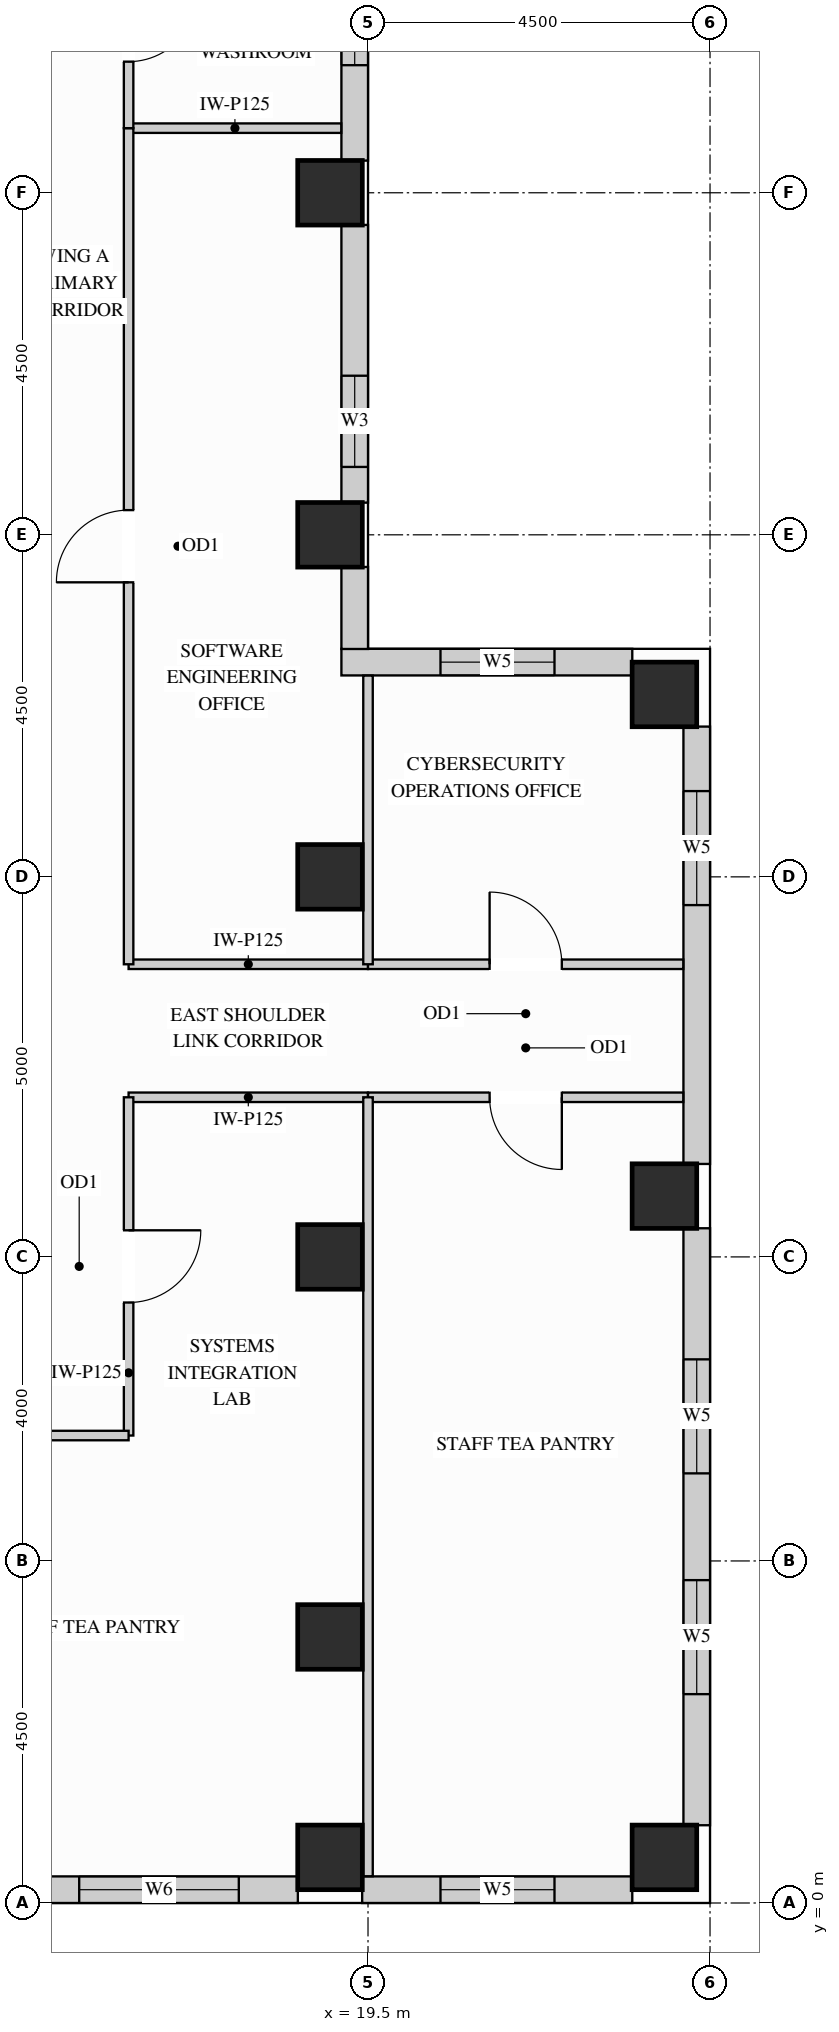
"""IFC4 building model, lengths in metres.
Left out: names, types, materials, properties, quantities, classifications, styles, units other than length and angle.
Written with IfcOpenShell. Run it as: python <this file> out.ifc"""

import sys

from ifc_helpers import new_model, si_unit, direction, frame, frame_2d, origin, origin_2d, place, context, subcontext, project, spatial, rectangle, extrude, source, transform, mapped, element, fill, save


model = new_model("IFC4")
c1 = context("Model", 3, precision=1e-05, world=origin(), true_north=direction((0.0, 1.0)))
c2 = subcontext(c1, "Body", "Model", "MODEL_VIEW")
j1 = project(units=[si_unit("LENGTHUNIT", "METRE"), si_unit("PLANEANGLEUNIT", "RADIAN")], contexts=[c1])
p1 = place(None, origin())
s1 = spatial("IfcSite", under=j1, at=p1, CompositionType="ELEMENT")
p2 = place(p1, origin())
s2 = spatial("IfcBuilding", under=s1, at=p2, CompositionType="ELEMENT")
p3 = place(p2, frame((0.0, 0.0, 266.4)))
s3 = spatial("IfcBuildingStorey", under=s2, at=p3, CompositionType="ELEMENT", Elevation=266.4)
m1 = source(origin(), c2, "Body", "SweptSolid", [
    extrude(rectangle(XDim=0.85, YDim=0.85, at=origin_2d()), origin(), (0.0, 0.0, 1.0), 3.4),
])
for number, where, z_axis, x_axis in (
    (1, (19.0, 13.5, 0.0), (0.0, 0.0, 1.0), (1.0, 0.0, 0.0)),
    (2, (19.0, 18.0, 0.0), (0.0, 0.0, 1.0), (1.0, 0.0, 0.0)),
    (3, (19.0, 22.5, 0.0), (0.0, 0.0, 1.0), (1.0, 0.0, 0.0)),
    (4, (19.0, 3.5, 0.0), (0.0, 0.0, 1.0), (1.0, 0.0, 0.0)),
    (5, (19.0, 8.5, 0.0), (0.0, 0.0, 1.0), (1.0, 0.0, 0.0)),
    (6, (19.0, 0.6, 0.0), (0.0, 0.0, 1.0), (1.0, 0.0, 0.0)),
    (7, (23.4, 0.6, 0.0), (0.0, 0.0, 1.0), (1.0, 0.0, 0.0)),
    (8, (23.4, 15.9, 0.0), (0.0, 0.0, 1.0), (1.0, 0.0, 0.0)),
    (9, (23.4, 9.3, 0.0), (0.0, 0.0, 1.0), (1.0, 0.0, 0.0)),
):
    element("IfcColumn", number, at=place(p3, frame(where, z_axis=z_axis, x_axis=x_axis)), inside=s3, PredefinedType="COLUMN", context=c2, shape_type="MappedRepresentation", body=[
        mapped(m1, transform((0.0, 0.0, 0.0), x_axis=(1.0, 0.0, 0.0), y_axis=(0.0, 1.0, 0.0), z_axis=(0.0, 0.0, 1.0))),
    ])
p4 = place(p3, frame((14.923, 0.175, 0.0), z_axis=(0.0, 0.0, 1.0), x_axis=(1.0, 0.0, 0.0)))
e10 = element("IfcWall", 10, at=p4, inside=s3, PredefinedType="SOLIDWALL", context=c2, shape_type="SweptSolid", body=[
    extrude(rectangle(XDim=3.654, YDim=0.35, at=frame_2d((1.827, 0.0))), origin(), (0.0, 0.0, 1.0), 3.385),
])
p5 = place(p4, frame((0.777, 0.0, 0.78)))
e11 = element("IfcOpeningElement", 11, at=p5, cuts=e10, PredefinedType="OPENING", context=c2, shape_type="SweptSolid", body=[
    extrude(rectangle(XDim=2.1, YDim=2.25, at=frame_2d((1.05, 1.125))), frame((0.0, 0.185, 0.0), z_axis=(0.0, -1.0, 0.0), x_axis=(1.0, 0.0, 0.0)), (0.0, 0.0, 1.0), 0.37),
])
p6 = place(p3, frame((19.423, 0.175, 0.0), z_axis=(0.0, 0.0, 1.0), x_axis=(1.0, 0.0, 0.0)))
e12 = element("IfcWall", 12, at=p6, inside=s3, PredefinedType="SOLIDWALL", context=c2, shape_type="SweptSolid", body=[
    extrude(rectangle(XDim=3.554, YDim=0.35, at=frame_2d((1.777, 0.0))), origin(), (0.0, 0.0, 1.0), 3.385),
])
p7 = place(p6, frame((1.031, 0.0, 0.78)))
e13 = element("IfcOpeningElement", 13, at=p7, cuts=e12, PredefinedType="OPENING", context=c2, shape_type="SweptSolid", body=[
    extrude(rectangle(XDim=1.5, YDim=2.0, at=frame_2d((0.75, 1.0))), frame((0.0, 0.185, 0.0), z_axis=(0.0, -1.0, 0.0), x_axis=(1.0, 0.0, 0.0)), (0.0, 0.0, 1.0), 0.37),
])
p8 = place(p3, frame((23.825, 1.023, 0.0), z_axis=(0.0, 0.0, 1.0), x_axis=(0.0, 1.0, 0.0)))
e14 = element("IfcWall", 14, at=p8, inside=s3, PredefinedType="SOLIDWALL", context=c2, shape_type="SweptSolid", body=[
    extrude(rectangle(XDim=7.854, YDim=0.35, at=frame_2d((3.927, 0.0))), origin(), (0.0, 0.0, 1.0), 3.385),
])
p9 = place(p8, frame((1.725, 0.0, 0.78)))
e15 = element("IfcOpeningElement", 15, at=p9, cuts=e14, PredefinedType="OPENING", context=c2, shape_type="SweptSolid", body=[
    extrude(rectangle(XDim=1.5, YDim=2.0, at=frame_2d((0.75, 1.0))), frame((0.0, 0.185, 0.0), z_axis=(0.0, -1.0, 0.0), x_axis=(1.0, 0.0, 0.0)), (0.0, 0.0, 1.0), 0.37),
])
p10 = place(p8, frame((4.629, 0.0, 0.78)))
e16 = element("IfcOpeningElement", 16, at=p10, cuts=e14, PredefinedType="OPENING", context=c2, shape_type="SweptSolid", body=[
    extrude(rectangle(XDim=1.5, YDim=2.0, at=frame_2d((0.75, 1.0))), frame((0.0, 0.185, 0.0), z_axis=(0.0, -1.0, 0.0), x_axis=(1.0, 0.0, 0.0)), (0.0, 0.0, 1.0), 0.37),
])
p11 = place(p3, frame((23.825, 9.723, 0.0), z_axis=(0.0, 0.0, 1.0), x_axis=(0.0, 1.0, 0.0)))
e17 = element("IfcWall", 17, at=p11, inside=s3, PredefinedType="SOLIDWALL", context=c2, shape_type="SweptSolid", body=[
    extrude(rectangle(XDim=5.754, YDim=0.35, at=frame_2d((2.877, 0.0))), origin(), (0.0, 0.0, 1.0), 3.385),
])
p12 = place(p11, frame((3.406, 0.0, 0.78)))
e18 = element("IfcOpeningElement", 18, at=p12, cuts=e17, PredefinedType="OPENING", context=c2, shape_type="SweptSolid", body=[
    extrude(rectangle(XDim=1.5, YDim=2.0, at=frame_2d((0.75, 1.0))), frame((0.0, 0.185, 0.0), z_axis=(0.0, -1.0, 0.0), x_axis=(1.0, 0.0, 0.0)), (0.0, 0.0, 1.0), 0.37),
])
p13 = place(p3, frame((22.977, 16.325, 0.0), z_axis=(0.0, 0.0, 1.0), x_axis=(-1.0, 0.0, 0.0)))
e19 = element("IfcWall", 19, at=p13, inside=s3, PredefinedType="SOLIDWALL", context=c2, shape_type="SweptSolid", body=[
    extrude(rectangle(XDim=3.827, YDim=0.35, at=frame_2d((1.914, 0.0))), origin(), (0.0, 0.0, 1.0), 3.385),
])
p14 = place(p13, frame((1.023, 0.0, 0.78)))
e20 = element("IfcOpeningElement", 20, at=p14, cuts=e19, PredefinedType="OPENING", context=c2, shape_type="SweptSolid", body=[
    extrude(rectangle(XDim=1.5, YDim=2.0, at=frame_2d((0.75, 1.0))), frame((0.0, 0.185, 0.0), z_axis=(0.0, -1.0, 0.0), x_axis=(1.0, 0.0, 0.0)), (0.0, 0.0, 1.0), 0.37),
])
m2 = source(origin(), c2, "Body", "SweptSolid", [
    extrude(rectangle(XDim=1.079, YDim=0.35, at=frame_2d((0.54, 0.0))), origin(), (0.0, 0.0, 1.0), 2.619),
])
p15 = place(p3, frame((19.325, 16.498, 0.0), z_axis=(0.0, 0.0, 1.0), x_axis=(0.0, 1.0, 0.0)))
e21 = element("IfcWall", 21, at=p15, inside=s3, PredefinedType="SOLIDWALL", context=c2, shape_type="MappedRepresentation", body=[
    mapped(m2, transform((0.0, 0.0, 0.0), x_axis=(1.0, 0.0, 0.0), y_axis=(0.0, 1.0, 0.0), z_axis=(0.0, 0.0, 1.0))),
])
p16 = place(p3, frame((19.325, 18.423, 0.0), z_axis=(0.0, 0.0, 1.0), x_axis=(0.0, 1.0, 0.0)))
e22 = element("IfcWall", 22, at=p16, inside=s3, PredefinedType="SOLIDWALL", context=c2, shape_type="SweptSolid", body=[
    extrude(rectangle(XDim=3.654, YDim=0.35, at=frame_2d((1.827, 0.0))), origin(), (0.0, 0.0, 1.0), 2.619),
])
p17 = place(p16, frame((0.47, 0.0, 0.78)))
e23 = element("IfcOpeningElement", 23, at=p17, cuts=e22, PredefinedType="OPENING", context=c2, shape_type="SweptSolid", body=[
    extrude(rectangle(XDim=1.2, YDim=1.659, at=frame_2d((0.6, 0.83))), frame((0.0, 0.185, 0.0), z_axis=(0.0, -1.0, 0.0), x_axis=(1.0, 0.0, 0.0)), (0.0, 0.0, 1.0), 0.37),
])
p18 = place(p3, frame((19.325, 22.923, 0.0), z_axis=(0.0, 0.0, 1.0), x_axis=(0.0, 1.0, 0.0)))
e24 = element("IfcWall", 24, at=p18, inside=s3, PredefinedType="SOLIDWALL", context=c2, shape_type="SweptSolid", body=[
    extrude(rectangle(XDim=3.454, YDim=0.35, at=frame_2d((1.727, 0.0))), origin(), (0.0, 0.0, 1.0), 2.619),
])
p19 = place(p18, frame((1.256, 0.0, 0.78)))
e25 = element("IfcOpeningElement", 25, at=p19, cuts=e24, PredefinedType="OPENING", context=c2, shape_type="SweptSolid", body=[
    extrude(rectangle(XDim=1.5, YDim=1.659, at=frame_2d((0.75, 0.83))), frame((0.0, 0.185, 0.0), z_axis=(0.0, -1.0, 0.0), x_axis=(1.0, 0.0, 0.0)), (0.0, 0.0, 1.0), 0.37),
])
m3 = source(origin(), c2, "Body", "SweptSolid", [
    extrude(rectangle(XDim=2.798, YDim=0.125, at=frame_2d((1.399, 0.0))), origin(), (0.0, 0.0, 1.0), 3.385),
])
p20 = place(p3, frame((16.35, 23.35, 0.0), z_axis=(0.0, 0.0, 1.0), x_axis=(1.0, 0.0, 0.0)))
e26 = element("IfcWall", 26, at=p20, inside=s3, PredefinedType="PARTITIONING", context=c2, shape_type="MappedRepresentation", body=[
    mapped(m3, transform((0.0, 0.0, 0.0), x_axis=(1.0, 0.0, 0.0), y_axis=(0.0, 1.0, 0.0), z_axis=(0.0, 0.0, 1.0))),
])
m4 = source(origin(), c2, "Body", "SweptSolid", [
    extrude(rectangle(XDim=3.15, YDim=0.125, at=frame_2d((1.575, 0.0))), origin(), (0.0, 0.0, 1.0), 3.385),
])
for number, where, z_axis, x_axis in (
    (27, (16.35, 12.35, 0.0), (0.0, 0.0, 1.0), (1.0, 0.0, 0.0)),
    (28, (16.35, 10.6, 0.0), (0.0, 0.0, 1.0), (1.0, 0.0, 0.0)),
):
    element("IfcWall", number, at=place(p3, frame(where, z_axis=z_axis, x_axis=x_axis)), inside=s3, PredefinedType="PARTITIONING", context=c2, shape_type="MappedRepresentation", body=[
        mapped(m4, transform((0.0, 0.0, 0.0), x_axis=(1.0, 0.0, 0.0), y_axis=(0.0, 1.0, 0.0), z_axis=(0.0, 0.0, 1.0))),
    ])
p21 = place(p3, frame((16.35, 6.15, 0.0), z_axis=(0.0, 0.0, 1.0), x_axis=(0.0, 1.0, 0.0)))
e29 = element("IfcWall", 29, at=p21, inside=s3, PredefinedType="PARTITIONING", context=c2, shape_type="SweptSolid", body=[
    extrude(rectangle(XDim=4.45, YDim=0.125, at=frame_2d((2.225, 0.0))), origin(), (0.0, 0.0, 1.0), 3.385),
])
p22 = place(p21, frame((1.75, 0.0, 0.0)))
e30 = element("IfcOpeningElement", 30, at=p22, cuts=e29, PredefinedType="OPENING", context=c2, shape_type="SweptSolid", body=[
    extrude(rectangle(XDim=0.95, YDim=2.15, at=frame_2d((0.475, 1.075))), frame((0.0, 0.073, 0.0), z_axis=(0.0, -1.0, 0.0), x_axis=(1.0, 0.0, 0.0)), (0.0, 0.0, 1.0), 0.145),
])
p23 = place(p3, frame((16.35, 12.35, 0.0), z_axis=(0.0, 0.0, 1.0), x_axis=(0.0, 1.0, 0.0)))
e31 = element("IfcWall", 31, at=p23, inside=s3, PredefinedType="PARTITIONING", context=c2, shape_type="SweptSolid", body=[
    extrude(rectangle(XDim=11.0, YDim=0.125, at=frame_2d((5.5, 0.0))), origin(), (0.0, 0.0, 1.0), 3.385),
])
p24 = place(p23, frame((5.025, 0.0, 0.0)))
e32 = element("IfcOpeningElement", 32, at=p24, cuts=e31, PredefinedType="OPENING", context=c2, shape_type="SweptSolid", body=[
    extrude(rectangle(XDim=0.95, YDim=2.15, at=frame_2d((0.475, 1.075))), frame((0.0, 0.073, 0.0), z_axis=(0.0, -1.0, 0.0), x_axis=(1.0, 0.0, 0.0)), (0.0, 0.0, 1.0), 0.145),
])
p25 = place(p3, frame((16.35, 23.35, 0.0), z_axis=(0.0, 0.0, 1.0), x_axis=(0.0, 1.0, 0.0)))
e33 = element("IfcWall", 33, at=p25, inside=s3, PredefinedType="PARTITIONING", context=c2, shape_type="SweptSolid", body=[
    extrude(rectangle(XDim=2.7, YDim=0.125, at=frame_2d((1.35, 0.0))), origin(), (0.0, 0.0, 1.0), 3.385),
])
p26 = place(p25, frame((0.875, 0.0, 0.0)))
e34 = element("IfcOpeningElement", 34, at=p26, cuts=e33, PredefinedType="OPENING", context=c2, shape_type="SweptSolid", body=[
    extrude(rectangle(XDim=0.9, YDim=2.15, at=frame_2d((0.45, 1.075))), frame((0.0, 0.073, 0.0), z_axis=(0.0, -1.0, 0.0), x_axis=(1.0, 0.0, 0.0)), (0.0, 0.0, 1.0), 0.145),
])
p27 = place(p3, frame((19.5, 10.6, 0.0), z_axis=(0.0, 0.0, 1.0), x_axis=(1.0, 0.0, 0.0)))
e35 = element("IfcWall", 35, at=p27, inside=s3, PredefinedType="PARTITIONING", context=c2, shape_type="SweptSolid", body=[
    extrude(rectangle(XDim=4.148, YDim=0.125, at=frame_2d((2.074, 0.0))), origin(), (0.0, 0.0, 1.0), 3.385),
])
p28 = place(p27, frame((1.6, 0.0, 0.0)))
e36 = element("IfcOpeningElement", 36, at=p28, cuts=e35, PredefinedType="OPENING", context=c2, shape_type="SweptSolid", body=[
    extrude(rectangle(XDim=0.95, YDim=2.15, at=frame_2d((0.475, 1.075))), frame((0.0, 0.073, 0.0), z_axis=(0.0, -1.0, 0.0), x_axis=(1.0, 0.0, 0.0)), (0.0, 0.0, 1.0), 0.145),
])
p29 = place(p3, frame((19.5, 12.35, 0.0), z_axis=(0.0, 0.0, 1.0), x_axis=(1.0, 0.0, 0.0)))
e37 = element("IfcWall", 37, at=p29, inside=s3, PredefinedType="PARTITIONING", context=c2, shape_type="SweptSolid", body=[
    extrude(rectangle(XDim=4.148, YDim=0.125, at=frame_2d((2.074, 0.0))), origin(), (0.0, 0.0, 1.0), 3.385),
])
p30 = place(p29, frame((1.6, 0.0, 0.0)))
e38 = element("IfcOpeningElement", 38, at=p30, cuts=e37, PredefinedType="OPENING", context=c2, shape_type="SweptSolid", body=[
    extrude(rectangle(XDim=0.95, YDim=2.15, at=frame_2d((0.475, 1.075))), frame((0.0, 0.073, 0.0), z_axis=(0.0, -1.0, 0.0), x_axis=(1.0, 0.0, 0.0)), (0.0, 0.0, 1.0), 0.145),
])
m5 = source(origin(), c2, "Body", "SweptSolid", [
    extrude(rectangle(XDim=10.248, YDim=0.125, at=frame_2d((5.124, 0.0))), origin(), (0.0, 0.0, 1.0), 3.385),
])
p31 = place(p3, frame((19.5, 0.352, 0.0), z_axis=(0.0, 0.0, 1.0), x_axis=(0.0, 1.0, 0.0)))
e39 = element("IfcWall", 39, at=p31, inside=s3, PredefinedType="PARTITIONING", context=c2, shape_type="MappedRepresentation", body=[
    mapped(m5, transform((0.0, 0.0, 0.0), x_axis=(1.0, 0.0, 0.0), y_axis=(0.0, 1.0, 0.0), z_axis=(0.0, 0.0, 1.0))),
])
m6 = source(origin(), c2, "Body", "SweptSolid", [
    extrude(rectangle(XDim=3.798, YDim=0.125, at=frame_2d((1.899, 0.0))), origin(), (0.0, 0.0, 1.0), 3.385),
])
p32 = place(p3, frame((19.5, 12.35, 0.0), z_axis=(0.0, 0.0, 1.0), x_axis=(0.0, 1.0, 0.0)))
e40 = element("IfcWall", 40, at=p32, inside=s3, PredefinedType="PARTITIONING", context=c2, shape_type="MappedRepresentation", body=[
    mapped(m6, transform((0.0, 0.0, 0.0), x_axis=(1.0, 0.0, 0.0), y_axis=(0.0, 1.0, 0.0), z_axis=(0.0, 0.0, 1.0))),
])
p33 = place(p3, frame((10.179, 6.15, 0.0), z_axis=(0.0, 0.0, 1.0), x_axis=(1.0, 0.0, 0.0)))
e41 = element("IfcWall", 41, at=p33, inside=s3, PredefinedType="PARTITIONING", context=c2, shape_type="SweptSolid", body=[
    extrude(rectangle(XDim=6.171, YDim=0.125, at=frame_2d((3.085, 0.0))), origin(), (0.0, 0.0, 1.0), 3.385),
])
p34 = place(p33, frame((2.611, 0.0, 0.0)))
e42 = element("IfcOpeningElement", 42, at=p34, cuts=e41, PredefinedType="OPENING", context=c2, shape_type="SweptSolid", body=[
    extrude(rectangle(XDim=0.95, YDim=2.15, at=frame_2d((0.475, 1.075))), frame((0.0, 0.073, 0.0), z_axis=(0.0, -1.0, 0.0), x_axis=(1.0, 0.0, 0.0)), (0.0, 0.0, 1.0), 0.145),
])
m7 = source(origin(), c2, "Body", "SweptSolid", [
    extrude(rectangle(XDim=0.95, YDim=2.15, at=frame_2d((0.475, 1.075))), frame((0.0, 0.025, 0.0), z_axis=(0.0, -1.0, 0.0), x_axis=(1.0, 0.0, 0.0)), (0.0, 0.0, 1.0), 0.05),
])
p35 = place(p22, origin())
e43 = element("IfcDoor", 43, at=p35, inside=s3, OperationType="SINGLE_SWING_RIGHT", PredefinedType="DOOR", context=c2, shape_type="MappedRepresentation", body=[
    mapped(m7, transform((0.0, 0.0, 0.0), x_axis=(1.0, 0.0, 0.0), y_axis=(0.0, 1.0, 0.0), z_axis=(0.0, 0.0, 1.0))),
])
fill(e30, e43)
p36 = place(p24, origin())
e44 = element("IfcDoor", 44, at=p36, inside=s3, OperationType="SINGLE_SWING_LEFT", PredefinedType="DOOR", context=c2, shape_type="MappedRepresentation", body=[
    mapped(m7, transform((0.0, 0.0, 0.0), x_axis=(1.0, 0.0, 0.0), y_axis=(0.0, 1.0, 0.0), z_axis=(0.0, 0.0, 1.0))),
])
fill(e32, e44)
p37 = place(p28, origin())
e45 = element("IfcDoor", 45, at=p37, inside=s3, OperationType="SINGLE_SWING_RIGHT", PredefinedType="DOOR", context=c2, shape_type="MappedRepresentation", body=[
    mapped(m7, transform((0.0, 0.0, 0.0), x_axis=(1.0, 0.0, 0.0), y_axis=(0.0, 1.0, 0.0), z_axis=(0.0, 0.0, 1.0))),
])
fill(e36, e45)
p38 = place(p30, origin())
e46 = element("IfcDoor", 46, at=p38, inside=s3, OperationType="SINGLE_SWING_LEFT", PredefinedType="DOOR", context=c2, shape_type="MappedRepresentation", body=[
    mapped(m7, transform((0.0, 0.0, 0.0), x_axis=(1.0, 0.0, 0.0), y_axis=(0.0, 1.0, 0.0), z_axis=(0.0, 0.0, 1.0))),
])
fill(e38, e46)
m8 = source(origin(), c2, "Body", "SweptSolid", [
    extrude(rectangle(XDim=0.9, YDim=2.15, at=frame_2d((0.45, 1.075))), frame((0.0, 0.025, 0.0), z_axis=(0.0, -1.0, 0.0), x_axis=(1.0, 0.0, 0.0)), (0.0, 0.0, 1.0), 0.05),
])
p39 = place(p26, origin())
e47 = element("IfcDoor", 47, at=p39, inside=s3, OperationType="SINGLE_SWING_RIGHT", PredefinedType="DOOR", context=c2, shape_type="MappedRepresentation", body=[
    mapped(m8, transform((0.0, 0.0, 0.0), x_axis=(1.0, 0.0, 0.0), y_axis=(0.0, 1.0, 0.0), z_axis=(0.0, 0.0, 1.0))),
])
fill(e34, e47)
m9 = source(origin(), c2, "Body", "SweptSolid", [
    extrude(rectangle(XDim=1.2, YDim=1.659, at=frame_2d((0.6, 0.83))), frame((0.0, 0.03, 0.0), z_axis=(0.0, -1.0, 0.0), x_axis=(1.0, 0.0, 0.0)), (0.0, 0.0, 1.0), 0.06),
])
p40 = place(p17, origin())
e48 = element("IfcWindow", 48, at=p40, inside=s3, PartitioningType="SINGLE_PANEL", PredefinedType="WINDOW", context=c2, shape_type="MappedRepresentation", body=[
    mapped(m9, transform((0.0, 0.0, 0.0), x_axis=(1.0, 0.0, 0.0), y_axis=(0.0, 1.0, 0.0), z_axis=(0.0, 0.0, 1.0))),
])
fill(e23, e48)
m10 = source(origin(), c2, "Body", "SweptSolid", [
    extrude(rectangle(XDim=1.5, YDim=2.0, at=frame_2d((0.75, 1.0))), frame((0.0, 0.03, 0.0), z_axis=(0.0, -1.0, 0.0), x_axis=(1.0, 0.0, 0.0)), (0.0, 0.0, 1.0), 0.06),
])
p41 = place(p7, origin())
e49 = element("IfcWindow", 49, at=p41, inside=s3, PartitioningType="SINGLE_PANEL", PredefinedType="WINDOW", context=c2, shape_type="MappedRepresentation", body=[
    mapped(m10, transform((0.0, 0.0, 0.0), x_axis=(1.0, 0.0, 0.0), y_axis=(0.0, 1.0, 0.0), z_axis=(0.0, 0.0, 1.0))),
])
fill(e13, e49)
p42 = place(p9, origin())
e50 = element("IfcWindow", 50, at=p42, inside=s3, PartitioningType="SINGLE_PANEL", PredefinedType="WINDOW", context=c2, shape_type="MappedRepresentation", body=[
    mapped(m10, transform((0.0, 0.0, 0.0), x_axis=(1.0, 0.0, 0.0), y_axis=(0.0, 1.0, 0.0), z_axis=(0.0, 0.0, 1.0))),
])
fill(e15, e50)
p43 = place(p10, origin())
e51 = element("IfcWindow", 51, at=p43, inside=s3, PartitioningType="SINGLE_PANEL", PredefinedType="WINDOW", context=c2, shape_type="MappedRepresentation", body=[
    mapped(m10, transform((0.0, 0.0, 0.0), x_axis=(1.0, 0.0, 0.0), y_axis=(0.0, 1.0, 0.0), z_axis=(0.0, 0.0, 1.0))),
])
fill(e16, e51)
p44 = place(p12, origin())
e52 = element("IfcWindow", 52, at=p44, inside=s3, PartitioningType="SINGLE_PANEL", PredefinedType="WINDOW", context=c2, shape_type="MappedRepresentation", body=[
    mapped(m10, transform((0.0, 0.0, 0.0), x_axis=(1.0, 0.0, 0.0), y_axis=(0.0, 1.0, 0.0), z_axis=(0.0, 0.0, 1.0))),
])
fill(e18, e52)
p45 = place(p14, origin())
e53 = element("IfcWindow", 53, at=p45, inside=s3, PartitioningType="SINGLE_PANEL", PredefinedType="WINDOW", context=c2, shape_type="MappedRepresentation", body=[
    mapped(m10, transform((0.0, 0.0, 0.0), x_axis=(1.0, 0.0, 0.0), y_axis=(0.0, 1.0, 0.0), z_axis=(0.0, 0.0, 1.0))),
])
fill(e20, e53)
m11 = source(origin(), c2, "Body", "SweptSolid", [
    extrude(rectangle(XDim=1.5, YDim=1.659, at=frame_2d((0.75, 0.83))), frame((0.0, 0.03, 0.0), z_axis=(0.0, -1.0, 0.0), x_axis=(1.0, 0.0, 0.0)), (0.0, 0.0, 1.0), 0.06),
])
p46 = place(p19, origin())
e54 = element("IfcWindow", 54, at=p46, inside=s3, PartitioningType="SINGLE_PANEL", PredefinedType="WINDOW", context=c2, shape_type="MappedRepresentation", body=[
    mapped(m11, transform((0.0, 0.0, 0.0), x_axis=(1.0, 0.0, 0.0), y_axis=(0.0, 1.0, 0.0), z_axis=(0.0, 0.0, 1.0))),
])
fill(e25, e54)
m12 = source(origin(), c2, "Body", "SweptSolid", [
    extrude(rectangle(XDim=2.1, YDim=2.25, at=frame_2d((1.05, 1.125))), frame((0.0, 0.03, 0.0), z_axis=(0.0, -1.0, 0.0), x_axis=(1.0, 0.0, 0.0)), (0.0, 0.0, 1.0), 0.06),
])
p47 = place(p5, origin())
e55 = element("IfcWindow", 55, at=p47, inside=s3, PartitioningType="SINGLE_PANEL", PredefinedType="WINDOW", context=c2, shape_type="MappedRepresentation", body=[
    mapped(m12, transform((0.0, 0.0, 0.0), x_axis=(1.0, 0.0, 0.0), y_axis=(0.0, 1.0, 0.0), z_axis=(0.0, 0.0, 1.0))),
])
fill(e11, e55)
save(model, sys.argv[1])
